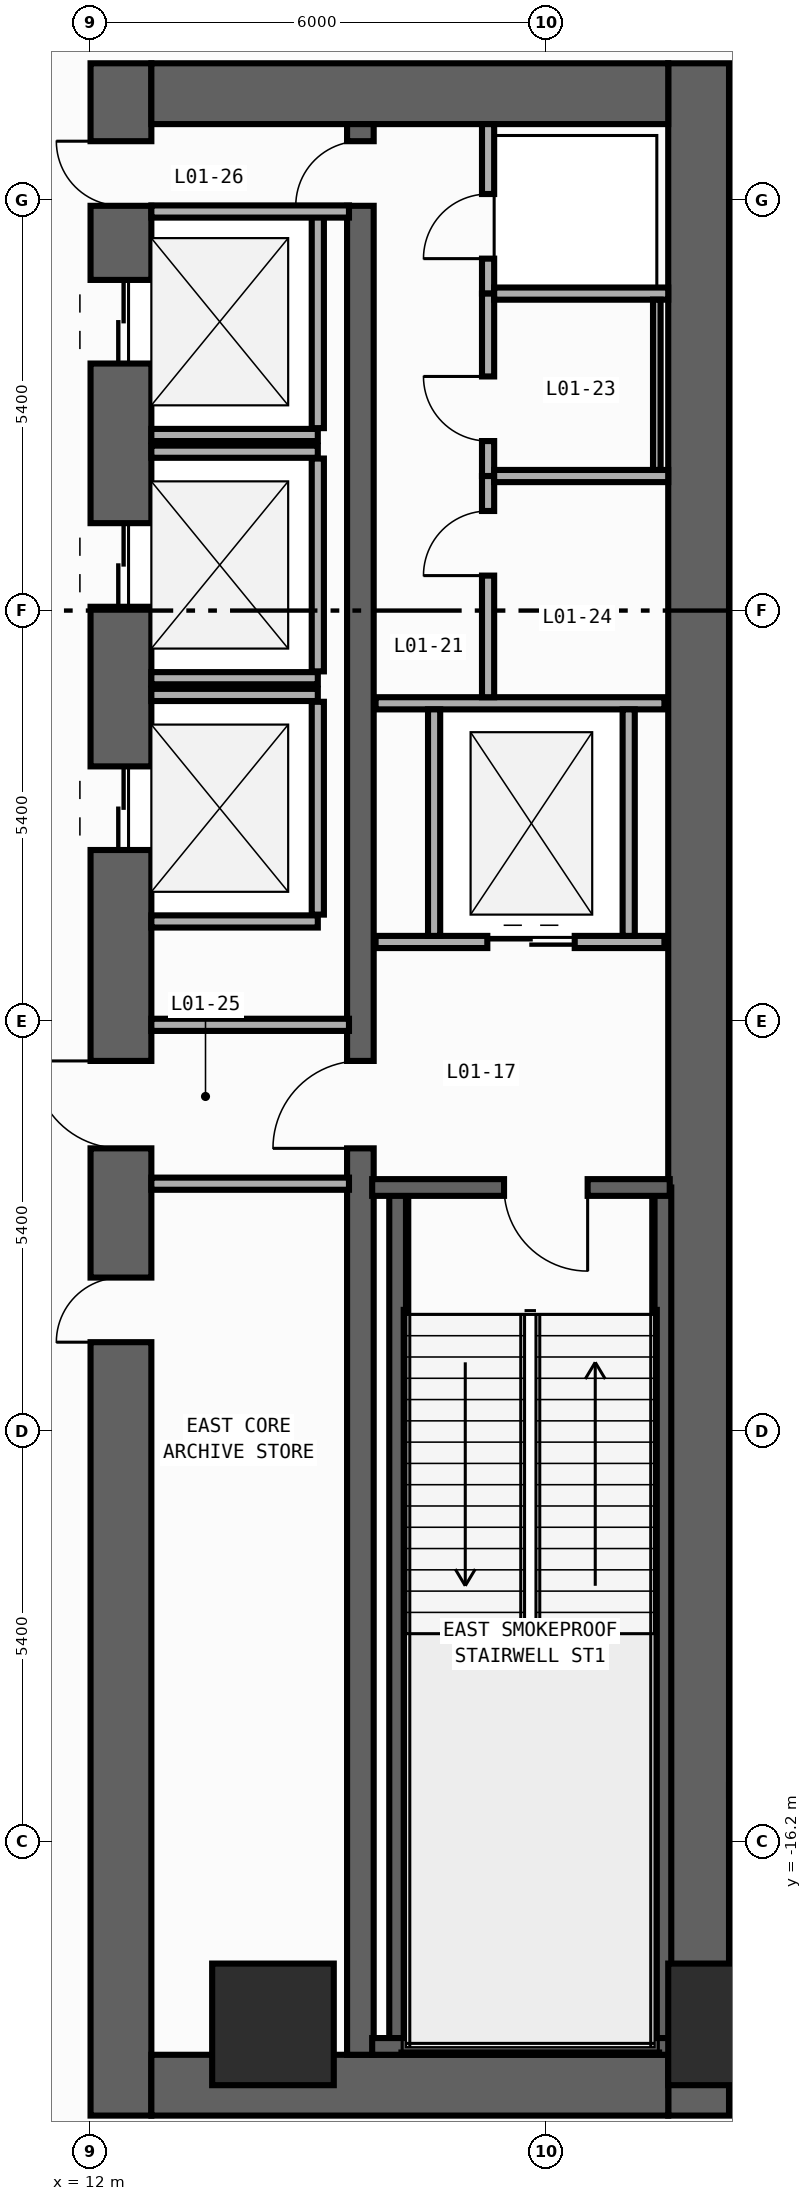
"""IFC4 building model, lengths in metres.
Left out: names, types, materials, properties, quantities, classifications, styles, units other than length and angle.
Written with IfcOpenShell. Run it as: python <this file> out.ifc"""

import sys

from ifc_helpers import new_model, si_unit, direction, frame, frame_2d, origin, origin_2d, place, context, subcontext, project, spatial, rectangle, extrude, element, fill, save


model = new_model("IFC4")
c1 = context("Model", 3, precision=1e-05, world=origin(), true_north=direction((0.0, 1.0)))
c2 = subcontext(c1, "Body", "Model", "MODEL_VIEW")
j1 = project(units=[si_unit("LENGTHUNIT", "METRE"), si_unit("PLANEANGLEUNIT", "RADIAN")], contexts=[c1])
p1 = place(None, origin())
s1 = spatial("IfcSite", under=j1, at=p1, CompositionType="ELEMENT")
p2 = place(p1, origin())
s2 = spatial("IfcBuilding", under=s1, at=p2, CompositionType="ELEMENT")
p3 = place(p2, origin())
s3 = spatial("IfcBuildingStorey", under=s2, at=p3, CompositionType="ELEMENT", Elevation=0.0)
p4 = place(p3, frame((12.4, -19.8, 0.0), z_axis=(0.0, 0.0, 1.0), x_axis=(0.0, 1.0, 0.0)))
e1 = element("IfcWall", 1, at=p4, inside=s3, PredefinedType="SHEAR", context=c2, shape_type="SweptSolid", body=[
    extrude(rectangle(XDim=27.0, YDim=0.8, at=frame_2d((13.5, 0.0))), origin(), (0.0, 0.0, 1.0), 5.7),
])
p5 = place(p4, frame((23.05, 0.0, 0.0)))
e2 = element("IfcOpeningElement", 2, at=p5, cuts=e1, PredefinedType="OPENING", context=c2, shape_type="SweptSolid", body=[
    extrude(rectangle(XDim=1.1, YDim=2.2, at=frame_2d((0.55, 1.1))), frame((0.0, 0.41, 0.0), z_axis=(0.0, -1.0, 0.0), x_axis=(1.0, 0.0, 0.0)), (0.0, 0.0, 1.0), 0.82),
])
p6 = place(p4, frame((19.85, 0.0, 0.0)))
e3 = element("IfcOpeningElement", 3, at=p6, cuts=e1, PredefinedType="OPENING", context=c2, shape_type="SweptSolid", body=[
    extrude(rectangle(XDim=1.1, YDim=2.2, at=frame_2d((0.55, 1.1))), frame((0.0, 0.41, 0.0), z_axis=(0.0, -1.0, 0.0), x_axis=(1.0, 0.0, 0.0)), (0.0, 0.0, 1.0), 0.82),
])
p7 = place(p4, frame((16.65, 0.0, 0.0)))
e4 = element("IfcOpeningElement", 4, at=p7, cuts=e1, PredefinedType="OPENING", context=c2, shape_type="SweptSolid", body=[
    extrude(rectangle(XDim=1.1, YDim=2.2, at=frame_2d((0.55, 1.1))), frame((0.0, 0.41, 0.0), z_axis=(0.0, -1.0, 0.0), x_axis=(1.0, 0.0, 0.0)), (0.0, 0.0, 1.0), 0.82),
])
p8 = place(p4, frame((10.175, 0.0, 0.0)))
e5 = element("IfcOpeningElement", 5, at=p8, cuts=e1, PredefinedType="OPENING", context=c2, shape_type="SweptSolid", body=[
    extrude(rectangle(XDim=0.85, YDim=2.1, at=frame_2d((0.425, 1.05))), frame((0.0, 0.41, 0.0), z_axis=(0.0, -1.0, 0.0), x_axis=(1.0, 0.0, 0.0)), (0.0, 0.0, 1.0), 0.82),
])
p9 = place(p4, frame((12.725, 0.0, 0.0)))
e6 = element("IfcOpeningElement", 6, at=p9, cuts=e1, PredefinedType="OPENING", context=c2, shape_type="SweptSolid", body=[
    extrude(rectangle(XDim=1.15, YDim=2.2, at=frame_2d((0.575, 1.1))), frame((0.0, 0.41, 0.0), z_axis=(0.0, -1.0, 0.0), x_axis=(1.0, 0.0, 0.0)), (0.0, 0.0, 1.0), 0.82),
])
p10 = place(p4, frame((25.125, 0.0, 0.0)))
e7 = element("IfcOpeningElement", 7, at=p10, cuts=e1, PredefinedType="OPENING", context=c2, shape_type="SweptSolid", body=[
    extrude(rectangle(XDim=0.85, YDim=2.1, at=frame_2d((0.425, 1.05))), frame((0.0, 0.41, 0.0), z_axis=(0.0, -1.0, 0.0), x_axis=(1.0, 0.0, 0.0)), (0.0, 0.0, 1.0), 0.82),
])
p11 = place(p3, frame((20.0, -19.8, 0.0), z_axis=(0.0, 0.0, 1.0), x_axis=(0.0, 1.0, 0.0)))
e8 = element("IfcWall", 8, at=p11, inside=s3, PredefinedType="SHEAR", context=c2, shape_type="SweptSolid", body=[
    extrude(rectangle(XDim=27.0, YDim=0.8, at=frame_2d((13.5, 0.0))), origin(), (0.0, 0.0, 1.0), 5.7),
])
for number, where, z_axis, x_axis in (
    (9, (12.8, -19.4, 0.0), (0.0, 0.0, 1.0), (1.0, 0.0, 0.0)),
    (10, (12.8, 6.8, 0.0), (0.0, 0.0, 1.0), (1.0, 0.0, 0.0)),
):
    element("IfcWall", number, at=place(p3, frame(where, z_axis=z_axis, x_axis=x_axis)), inside=s3, PredefinedType="SHEAR", context=c2, shape_type="SweptSolid", body=[
        extrude(rectangle(XDim=6.8, YDim=0.8, at=frame_2d((3.4, 0.0))), origin(), (0.0, 0.0, 1.0), 5.7),
    ])
p12 = place(p3, frame((15.55, -19.0, 0.0), z_axis=(0.0, 0.0, 1.0), x_axis=(0.0, 1.0, 0.0)))
e11 = element("IfcWall", 11, at=p12, inside=s3, PredefinedType="SHEAR", context=c2, shape_type="SweptSolid", body=[
    extrude(rectangle(XDim=25.4, YDim=0.35, at=frame_2d((12.7, 0.0))), origin(), (0.0, 0.0, 1.0), 5.7),
])
p13 = place(p12, frame((11.925, 0.0, 0.0)))
e12 = element("IfcOpeningElement", 12, at=p13, cuts=e11, PredefinedType="OPENING", context=c2, shape_type="SweptSolid", body=[
    extrude(rectangle(XDim=1.15, YDim=2.2, at=frame_2d((0.575, 1.1))), frame((0.0, 0.185, 0.0), z_axis=(0.0, -1.0, 0.0), x_axis=(1.0, 0.0, 0.0)), (0.0, 0.0, 1.0), 0.37),
])
p14 = place(p12, frame((24.325, 0.0, 0.0)))
e13 = element("IfcOpeningElement", 13, at=p14, cuts=e11, PredefinedType="OPENING", context=c2, shape_type="SweptSolid", body=[
    extrude(rectangle(XDim=0.85, YDim=2.1, at=frame_2d((0.425, 1.05))), frame((0.0, 0.185, 0.0), z_axis=(0.0, -1.0, 0.0), x_axis=(1.0, 0.0, 0.0)), (0.0, 0.0, 1.0), 0.37),
])
for number, where, z_axis, x_axis in (
    (14, (16.04, -18.89, 0.0), (0.0, 0.0, 1.0), (0.0, 1.0, 0.0)),
    (15, (19.53, -18.89, 0.0), (0.0, 0.0, 1.0), (0.0, 1.0, 0.0)),
):
    element("IfcWall", number, at=place(p3, frame(where, z_axis=z_axis, x_axis=x_axis)), inside=s3, PredefinedType="SHEAR", context=c2, shape_type="SweptSolid", body=[
        extrude(rectangle(XDim=11.3, YDim=0.22, at=frame_2d((5.65, 0.0))), origin(), (0.0, 0.0, 1.0), 5.7),
    ])
p15 = place(p3, frame((15.705, -18.89, 0.0), z_axis=(0.0, 0.0, 1.0), x_axis=(1.0, 0.0, 0.0)))
e16 = element("IfcWall", 16, at=p15, inside=s3, PredefinedType="SHEAR", context=c2, shape_type="SweptSolid", body=[
    extrude(rectangle(XDim=3.915, YDim=0.22, at=frame_2d((1.958, 0.0))), origin(), (0.0, 0.0, 1.0), 5.7),
])
p16 = place(p3, frame((19.62, -7.59, 0.0), z_axis=(0.0, 0.0, 1.0), x_axis=(-1.0, 0.0, 0.0)))
e17 = element("IfcWall", 17, at=p16, inside=s3, PredefinedType="SHEAR", context=c2, shape_type="SweptSolid", body=[
    extrude(rectangle(XDim=3.915, YDim=0.22, at=frame_2d((1.958, 0.0))), origin(), (0.0, 0.0, 1.0), 5.7),
])
p17 = place(p16, frame((1.08, 0.0, 0.0)))
e18 = element("IfcOpeningElement", 18, at=p17, cuts=e17, PredefinedType="OPENING", context=c2, shape_type="SweptSolid", body=[
    extrude(rectangle(XDim=1.1, YDim=2.2, at=frame_2d((0.55, 1.1))), frame((0.0, 0.12, 0.0), z_axis=(0.0, -1.0, 0.0), x_axis=(1.0, 0.0, 0.0)), (0.0, 0.0, 1.0), 0.24),
])
for number, where, z_axis, x_axis in (
    (19, (20.4, -18.6, 0.0), (0.0, 0.0, 1.0), (1.0, 0.0, 0.0)),
    (20, (14.4, -18.6, 0.0), (0.0, 0.0, 1.0), (1.0, 0.0, 0.0)),
):
    element("IfcColumn", number, at=place(p3, frame(where, z_axis=z_axis, x_axis=x_axis)), inside=s3, PredefinedType="COLUMN", context=c2, shape_type="SweptSolid", body=[
        extrude(rectangle(XDim=1.6, YDim=1.6, at=origin_2d()), origin(), (0.0, 0.0, 1.0), 6.0),
    ])
p18 = place(p3, frame((12.8, 2.31, 0.0), z_axis=(0.0, 0.0, 1.0), x_axis=(1.0, 0.0, 0.0)))
e21 = element("IfcWall", 21, at=p18, inside=s3, PredefinedType="STANDARD", context=c2, shape_type="SweptSolid", body=[
    extrude(rectangle(XDim=2.19, YDim=0.16, at=frame_2d((1.095, 0.0))), origin(), (0.0, 0.0, 1.0), 5.7),
])
p19 = place(p3, frame((14.99, 2.4, 0.0), z_axis=(0.0, 0.0, 1.0), x_axis=(0.0, 1.0, 0.0)))
e22 = element("IfcWall", 22, at=p19, inside=s3, PredefinedType="STANDARD", context=c2, shape_type="SweptSolid", body=[
    extrude(rectangle(XDim=2.8, YDim=0.16, at=frame_2d((1.4, 0.0))), origin(), (0.0, 0.0, 1.0), 5.7),
])
for number, where, z_axis, x_axis in (
    (23, (12.8, -0.89, 0.0), (0.0, 0.0, 1.0), (1.0, 0.0, 0.0)),
    (24, (12.8, 2.09, 0.0), (0.0, 0.0, 1.0), (1.0, 0.0, 0.0)),
):
    element("IfcWall", number, at=place(p3, frame(where, z_axis=z_axis, x_axis=x_axis)), inside=s3, PredefinedType="STANDARD", context=c2, shape_type="SweptSolid", body=[
        extrude(rectangle(XDim=2.19, YDim=0.16, at=frame_2d((1.095, 0.0))), origin(), (0.0, 0.0, 1.0), 5.7),
    ])
p20 = place(p3, frame((14.99, -0.8, 0.0), z_axis=(0.0, 0.0, 1.0), x_axis=(0.0, 1.0, 0.0)))
e25 = element("IfcWall", 25, at=p20, inside=s3, PredefinedType="STANDARD", context=c2, shape_type="SweptSolid", body=[
    extrude(rectangle(XDim=2.8, YDim=0.16, at=frame_2d((1.4, 0.0))), origin(), (0.0, 0.0, 1.0), 5.7),
])
for number, where, z_axis, x_axis in (
    (26, (12.8, -4.09, 0.0), (0.0, 0.0, 1.0), (1.0, 0.0, 0.0)),
    (27, (12.8, -1.11, 0.0), (0.0, 0.0, 1.0), (1.0, 0.0, 0.0)),
):
    element("IfcWall", number, at=place(p3, frame(where, z_axis=z_axis, x_axis=x_axis)), inside=s3, PredefinedType="STANDARD", context=c2, shape_type="SweptSolid", body=[
        extrude(rectangle(XDim=2.19, YDim=0.16, at=frame_2d((1.095, 0.0))), origin(), (0.0, 0.0, 1.0), 5.7),
    ])
p21 = place(p3, frame((14.99, -4.0, 0.0), z_axis=(0.0, 0.0, 1.0), x_axis=(0.0, 1.0, 0.0)))
e28 = element("IfcWall", 28, at=p21, inside=s3, PredefinedType="STANDARD", context=c2, shape_type="SweptSolid", body=[
    extrude(rectangle(XDim=2.8, YDim=0.16, at=frame_2d((1.4, 0.0))), origin(), (0.0, 0.0, 1.0), 5.7),
])
p22 = place(p3, frame((15.75, -4.36, 0.0), z_axis=(0.0, 0.0, 1.0), x_axis=(1.0, 0.0, 0.0)))
e29 = element("IfcWall", 29, at=p22, inside=s3, PredefinedType="STANDARD", context=c2, shape_type="SweptSolid", body=[
    extrude(rectangle(XDim=3.8, YDim=0.16, at=frame_2d((1.9, 0.0))), origin(), (0.0, 0.0, 1.0), 5.7),
])
p23 = place(p22, frame((1.47, 0.0, 0.0)))
e30 = element("IfcOpeningElement", 30, at=p23, cuts=e29, PredefinedType="OPENING", context=c2, shape_type="SweptSolid", body=[
    extrude(rectangle(XDim=1.15, YDim=2.2, at=frame_2d((0.575, 1.1))), frame((0.0, 0.09, 0.0), z_axis=(0.0, -1.0, 0.0), x_axis=(1.0, 0.0, 0.0)), (0.0, 0.0, 1.0), 0.18),
])
p24 = place(p3, frame((15.75, -1.22, 0.0), z_axis=(0.0, 0.0, 1.0), x_axis=(1.0, 0.0, 0.0)))
e31 = element("IfcWall", 31, at=p24, inside=s3, PredefinedType="STANDARD", context=c2, shape_type="SweptSolid", body=[
    extrude(rectangle(XDim=3.8, YDim=0.16, at=frame_2d((1.9, 0.0))), origin(), (0.0, 0.0, 1.0), 5.7),
])
for number, where, z_axis, x_axis in (
    (32, (16.52, -4.28, 0.0), (0.0, 0.0, 1.0), (0.0, 1.0, 0.0)),
    (33, (19.08, -4.28, 0.0), (0.0, 0.0, 1.0), (0.0, 1.0, 0.0)),
):
    element("IfcWall", number, at=place(p3, frame(where, z_axis=z_axis, x_axis=x_axis)), inside=s3, PredefinedType="STANDARD", context=c2, shape_type="SweptSolid", body=[
        extrude(rectangle(XDim=2.98, YDim=0.16, at=frame_2d((1.49, 0.0))), origin(), (0.0, 0.0, 1.0), 5.7),
    ])
for number, where, z_axis, x_axis in (
    (34, (12.8, -5.45, 0.0), (0.0, 0.0, 1.0), (1.0, 0.0, 0.0)),
    (35, (12.8, -7.54, 0.0), (0.0, 0.0, 1.0), (1.0, 0.0, 0.0)),
    (36, (12.8, 5.25, 0.0), (0.0, 0.0, 1.0), (1.0, 0.0, 0.0)),
):
    element("IfcWall", number, at=place(p3, frame(where, z_axis=z_axis, x_axis=x_axis)), inside=s3, PredefinedType="STANDARD", context=c2, shape_type="SweptSolid", body=[
        extrude(rectangle(XDim=2.6, YDim=0.16, at=frame_2d((1.3, 0.0))), origin(), (0.0, 0.0, 1.0), 5.7),
    ])
p25 = place(p3, frame((17.23, 4.17, 0.0), z_axis=(0.0, 0.0, 1.0), x_axis=(0.0, 1.0, 0.0)))
e37 = element("IfcWall", 37, at=p25, inside=s3, PredefinedType="PARTITIONING", context=c2, shape_type="SweptSolid", body=[
    extrude(rectangle(XDim=2.23, YDim=0.16, at=frame_2d((1.115, 0.0))), origin(), (0.0, 0.0, 1.0), 5.7),
])
p26 = place(p25, frame((0.46, 0.0, 0.0)))
e38 = element("IfcOpeningElement", 38, at=p26, cuts=e37, PredefinedType="OPENING", context=c2, shape_type="SweptSolid", body=[
    extrude(rectangle(XDim=0.85, YDim=2.1, at=frame_2d((0.425, 1.05))), frame((0.0, 0.09, 0.0), z_axis=(0.0, -1.0, 0.0), x_axis=(1.0, 0.0, 0.0)), (0.0, 0.0, 1.0), 0.18),
])
p27 = place(p3, frame((17.23, 1.77, 0.0), z_axis=(0.0, 0.0, 1.0), x_axis=(0.0, 1.0, 0.0)))
e39 = element("IfcWall", 39, at=p27, inside=s3, PredefinedType="PARTITIONING", context=c2, shape_type="SweptSolid", body=[
    extrude(rectangle(XDim=2.4, YDim=0.16, at=frame_2d((1.2, 0.0))), origin(), (0.0, 0.0, 1.0), 5.7),
])
p28 = place(p27, frame((0.46, 0.0, 0.0)))
e40 = element("IfcOpeningElement", 40, at=p28, cuts=e39, PredefinedType="OPENING", context=c2, shape_type="SweptSolid", body=[
    extrude(rectangle(XDim=0.85, YDim=2.1, at=frame_2d((0.425, 1.05))), frame((0.0, 0.09, 0.0), z_axis=(0.0, -1.0, 0.0), x_axis=(1.0, 0.0, 0.0)), (0.0, 0.0, 1.0), 0.18),
])
p29 = place(p3, frame((17.23, -1.14, 0.0), z_axis=(0.0, 0.0, 1.0), x_axis=(0.0, 1.0, 0.0)))
e41 = element("IfcWall", 41, at=p29, inside=s3, PredefinedType="PARTITIONING", context=c2, shape_type="SweptSolid", body=[
    extrude(rectangle(XDim=2.91, YDim=0.16, at=frame_2d((1.455, 0.0))), origin(), (0.0, 0.0, 1.0), 5.7),
])
p30 = place(p29, frame((1.6, 0.0, 0.0)))
e42 = element("IfcOpeningElement", 42, at=p30, cuts=e41, PredefinedType="OPENING", context=c2, shape_type="SweptSolid", body=[
    extrude(rectangle(XDim=0.85, YDim=2.1, at=frame_2d((0.425, 1.05))), frame((0.0, 0.09, 0.0), z_axis=(0.0, -1.0, 0.0), x_axis=(1.0, 0.0, 0.0)), (0.0, 0.0, 1.0), 0.18),
])
for number, where, z_axis, x_axis in (
    (43, (17.31, 4.17, 0.0), (0.0, 0.0, 1.0), (1.0, 0.0, 0.0)),
    (44, (17.31, 1.77, 0.0), (0.0, 0.0, 1.0), (1.0, 0.0, 0.0)),
):
    element("IfcWall", number, at=place(p3, frame(where, z_axis=z_axis, x_axis=x_axis)), inside=s3, PredefinedType="PARTITIONING", context=c2, shape_type="SweptSolid", body=[
        extrude(rectangle(XDim=2.29, YDim=0.16, at=frame_2d((1.145, 0.0))), origin(), (0.0, 0.0, 1.0), 5.7),
    ])
p31 = place(p3, frame((20.4, -15.52, 0.0), z_axis=(0.0, 0.0, 1.0), x_axis=(1.0, 0.0, 0.0)))
e45 = element("IfcWall", 45, at=p31, inside=s3, PredefinedType="PARTITIONING", context=c2, shape_type="SweptSolid", body=[
    extrude(rectangle(XDim=3.845, YDim=0.14, at=frame_2d((1.923, 0.0))), origin(), (0.0, 0.0, 1.0), 5.7),
])
p32 = place(p3, frame((19.45, 4.09, 0.0), z_axis=(0.0, 0.0, 1.0), x_axis=(0.0, -1.0, 0.0)))
e46 = element("IfcWall", 46, at=p32, inside=s3, PredefinedType="PARTITIONING", context=c2, shape_type="SweptSolid", body=[
    extrude(rectangle(XDim=2.24, YDim=0.1, at=frame_2d((1.12, 0.0))), origin(), (0.0, 0.0, 1.0), 5.7),
])
p33 = place(p17, origin())
e47 = element("IfcDoor", 47, at=p33, inside=s3, OperationType="SINGLE_SWING_LEFT", PredefinedType="DOOR", context=c2, shape_type="SweptSolid", body=[
    extrude(rectangle(XDim=1.1, YDim=2.2, at=frame_2d((0.55, 1.1))), frame((0.0, 0.025, 0.0), z_axis=(0.0, -1.0, 0.0), x_axis=(1.0, 0.0, 0.0)), (0.0, 0.0, 1.0), 0.05),
])
fill(e18, e47)
p34 = place(p5, origin())
e48 = element("IfcDoor", 48, at=p34, inside=s3, OperationType="DOUBLE_DOOR_SLIDING", PredefinedType="DOOR", context=c2, shape_type="SweptSolid", body=[
    extrude(rectangle(XDim=1.1, YDim=2.2, at=frame_2d((0.55, 1.1))), frame((0.0, 0.025, 0.0), z_axis=(0.0, -1.0, 0.0), x_axis=(1.0, 0.0, 0.0)), (0.0, 0.0, 1.0), 0.05),
])
fill(e2, e48)
p35 = place(p6, origin())
e49 = element("IfcDoor", 49, at=p35, inside=s3, OperationType="DOUBLE_DOOR_SLIDING", PredefinedType="DOOR", context=c2, shape_type="SweptSolid", body=[
    extrude(rectangle(XDim=1.1, YDim=2.2, at=frame_2d((0.55, 1.1))), frame((0.0, 0.025, 0.0), z_axis=(0.0, -1.0, 0.0), x_axis=(1.0, 0.0, 0.0)), (0.0, 0.0, 1.0), 0.05),
])
fill(e3, e49)
p36 = place(p7, origin())
e50 = element("IfcDoor", 50, at=p36, inside=s3, OperationType="DOUBLE_DOOR_SLIDING", PredefinedType="DOOR", context=c2, shape_type="SweptSolid", body=[
    extrude(rectangle(XDim=1.1, YDim=2.2, at=frame_2d((0.55, 1.1))), frame((0.0, 0.025, 0.0), z_axis=(0.0, -1.0, 0.0), x_axis=(1.0, 0.0, 0.0)), (0.0, 0.0, 1.0), 0.05),
])
fill(e4, e50)
p37 = place(p8, origin())
e51 = element("IfcDoor", 51, at=p37, inside=s3, OperationType="SINGLE_SWING_LEFT", PredefinedType="DOOR", context=c2, shape_type="SweptSolid", body=[
    extrude(rectangle(XDim=0.85, YDim=2.1, at=frame_2d((0.425, 1.05))), frame((0.0, 0.025, 0.0), z_axis=(0.0, -1.0, 0.0), x_axis=(1.0, 0.0, 0.0)), (0.0, 0.0, 1.0), 0.05),
])
fill(e5, e51)
p38 = place(p9, origin())
e52 = element("IfcDoor", 52, at=p38, inside=s3, OperationType="SINGLE_SWING_RIGHT", PredefinedType="DOOR", context=c2, shape_type="SweptSolid", body=[
    extrude(rectangle(XDim=1.15, YDim=2.2, at=frame_2d((0.575, 1.1))), frame((0.0, 0.025, 0.0), z_axis=(0.0, -1.0, 0.0), x_axis=(1.0, 0.0, 0.0)), (0.0, 0.0, 1.0), 0.05),
])
fill(e6, e52)
p39 = place(p13, origin())
e53 = element("IfcDoor", 53, at=p39, inside=s3, OperationType="SINGLE_SWING_LEFT", PredefinedType="DOOR", context=c2, shape_type="SweptSolid", body=[
    extrude(rectangle(XDim=1.15, YDim=2.2, at=frame_2d((0.575, 1.1))), frame((0.0, 0.025, 0.0), z_axis=(0.0, -1.0, 0.0), x_axis=(1.0, 0.0, 0.0)), (0.0, 0.0, 1.0), 0.05),
])
fill(e12, e53)
p40 = place(p10, origin())
e54 = element("IfcDoor", 54, at=p40, inside=s3, OperationType="SINGLE_SWING_RIGHT", PredefinedType="DOOR", context=c2, shape_type="SweptSolid", body=[
    extrude(rectangle(XDim=0.85, YDim=2.1, at=frame_2d((0.425, 1.05))), frame((0.0, 0.025, 0.0), z_axis=(0.0, -1.0, 0.0), x_axis=(1.0, 0.0, 0.0)), (0.0, 0.0, 1.0), 0.05),
])
fill(e7, e54)
p41 = place(p14, origin())
e55 = element("IfcDoor", 55, at=p41, inside=s3, OperationType="SINGLE_SWING_LEFT", PredefinedType="DOOR", context=c2, shape_type="SweptSolid", body=[
    extrude(rectangle(XDim=0.85, YDim=2.1, at=frame_2d((0.425, 1.05))), frame((0.0, 0.025, 0.0), z_axis=(0.0, -1.0, 0.0), x_axis=(1.0, 0.0, 0.0)), (0.0, 0.0, 1.0), 0.05),
])
fill(e13, e55)
p42 = place(p23, origin())
e56 = element("IfcDoor", 56, at=p42, inside=s3, OperationType="DOUBLE_DOOR_SLIDING", PredefinedType="DOOR", context=c2, shape_type="SweptSolid", body=[
    extrude(rectangle(XDim=1.15, YDim=2.2, at=frame_2d((0.575, 1.1))), frame((0.0, 0.025, 0.0), z_axis=(0.0, -1.0, 0.0), x_axis=(1.0, 0.0, 0.0)), (0.0, 0.0, 1.0), 0.05),
])
fill(e30, e56)
p43 = place(p26, origin())
e57 = element("IfcDoor", 57, at=p43, inside=s3, OperationType="SINGLE_SWING_LEFT", PredefinedType="DOOR", context=c2, shape_type="SweptSolid", body=[
    extrude(rectangle(XDim=0.85, YDim=2.1, at=frame_2d((0.425, 1.05))), frame((0.0, 0.025, 0.0), z_axis=(0.0, -1.0, 0.0), x_axis=(1.0, 0.0, 0.0)), (0.0, 0.0, 1.0), 0.05),
])
fill(e38, e57)
p44 = place(p28, origin())
e58 = element("IfcDoor", 58, at=p44, inside=s3, OperationType="SINGLE_SWING_RIGHT", PredefinedType="DOOR", context=c2, shape_type="SweptSolid", body=[
    extrude(rectangle(XDim=0.85, YDim=2.1, at=frame_2d((0.425, 1.05))), frame((0.0, 0.025, 0.0), z_axis=(0.0, -1.0, 0.0), x_axis=(1.0, 0.0, 0.0)), (0.0, 0.0, 1.0), 0.05),
])
fill(e40, e58)
p45 = place(p30, origin())
e59 = element("IfcDoor", 59, at=p45, inside=s3, OperationType="SINGLE_SWING_LEFT", PredefinedType="DOOR", context=c2, shape_type="SweptSolid", body=[
    extrude(rectangle(XDim=0.85, YDim=2.1, at=frame_2d((0.425, 1.05))), frame((0.0, 0.025, 0.0), z_axis=(0.0, -1.0, 0.0), x_axis=(1.0, 0.0, 0.0)), (0.0, 0.0, 1.0), 0.05),
])
fill(e42, e59)
save(model, sys.argv[1])
